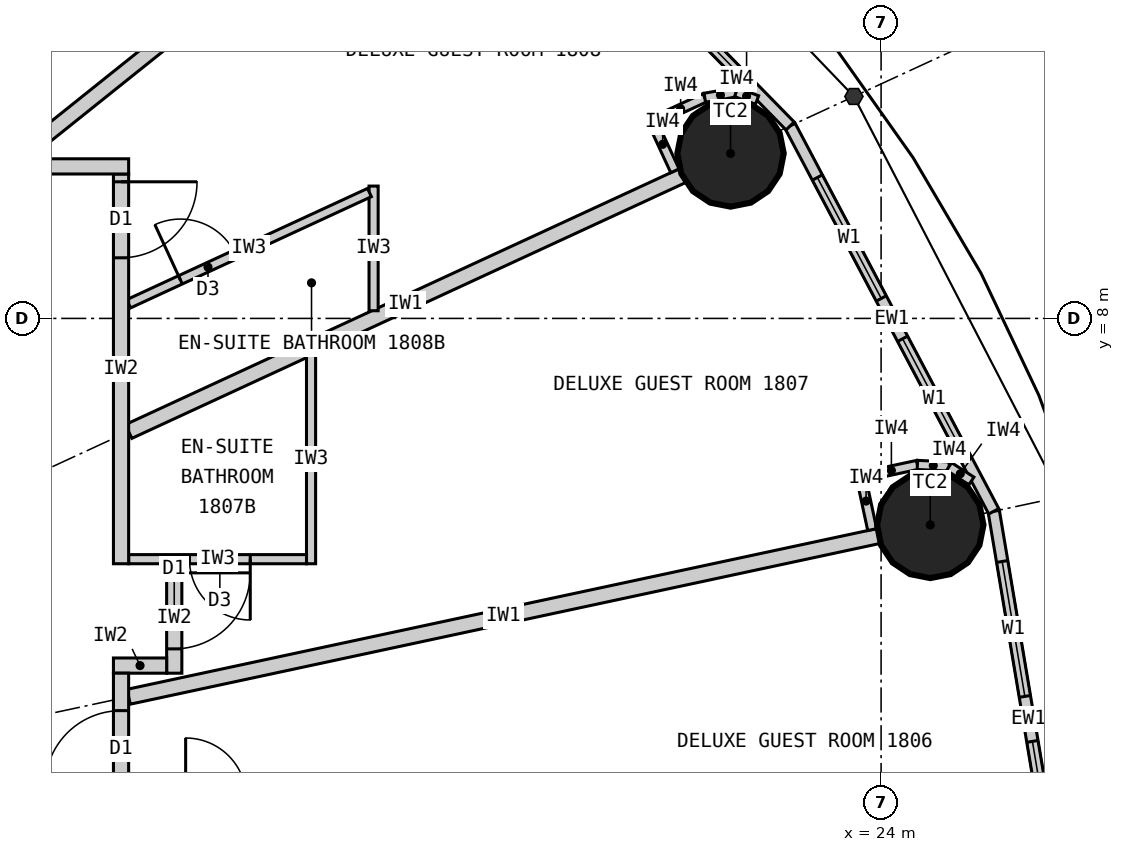
"""IFC4 building model, lengths in metres.
Left out: names, types, materials, properties, quantities, classifications, styles, units other than length and angle.
Written with IfcOpenShell. Run it as: python <this file> out.ifc"""

import sys

from ifc_helpers import new_model, si_unit, direction, frame, frame_2d, origin, origin_2d, place, context, subcontext, project, spatial, rectangle, circle, extrude, element, fill, save


model = new_model("IFC4")
c1 = context("Model", 3, precision=1e-05, world=origin(), true_north=direction((0.0, 1.0)))
c2 = subcontext(c1, "Body", "Model", "MODEL_VIEW")
j1 = project(units=[si_unit("LENGTHUNIT", "METRE"), si_unit("PLANEANGLEUNIT", "RADIAN")], contexts=[c1])
p1 = place(None, origin())
s1 = spatial("IfcSite", under=j1, at=p1, CompositionType="ELEMENT")
p2 = place(p1, origin())
s2 = spatial("IfcBuilding", under=s1, at=p2, CompositionType="ELEMENT")
p3 = place(p2, frame((0.0, 0.0, 73.8)))
s3 = spatial("IfcBuildingStorey", under=s2, at=p3, CompositionType="ELEMENT", Elevation=73.8)
for number, where, z_axis, x_axis in (
    (1, (24.647, 5.283, 0.0), (0.0, 0.0, 1.0), (1.0, 0.0, 0.0)),
    (2, (22.019, 10.17, 0.0), (0.0, 0.0, 1.0), (1.0, 0.0, 0.0)),
):
    element("IfcColumn", number, at=place(p3, frame(where, z_axis=z_axis, x_axis=x_axis)), inside=s3, PredefinedType="COLUMN", context=c2, shape_type="SweptSolid", body=[
        extrude(circle(Radius=0.7, at=origin_2d()), origin(), (0.0, 0.0, 1.0), 3.3),
    ])
p4 = place(p3, frame((26.4, 0.0, 0.0), z_axis=(0.0, 0.0, 1.0), x_axis=(-0.165642551694, 0.986185857264, 0.0)))
e3 = element("IfcWall", 3, at=p4, inside=s3, PredefinedType="ELEMENTEDWALL", context=c2, shape_type="SweptSolid", body=[
    extrude(rectangle(XDim=5.539, YDim=0.15, at=frame_2d((2.77, 0.0))), origin(), (0.0, 0.0, 1.0), 3.12),
])
p5 = place(p4, frame((0.669, 0.0, 0.9)))
e4 = element("IfcOpeningElement", 4, at=p5, cuts=e3, PredefinedType="OPENING", context=c2, shape_type="SweptSolid", body=[
    extrude(rectangle(XDim=1.8, YDim=1.9, at=frame_2d((0.9, 0.95))), frame((0.0, 0.085, 0.0), z_axis=(0.0, -1.0, 0.0), x_axis=(1.0, 0.0, 0.0)), (0.0, 0.0, 1.0), 0.17),
])
p6 = place(p4, frame((3.07, 0.0, 0.9)))
e5 = element("IfcOpeningElement", 5, at=p6, cuts=e3, PredefinedType="OPENING", context=c2, shape_type="SweptSolid", body=[
    extrude(rectangle(XDim=1.8, YDim=1.9, at=frame_2d((0.9, 0.95))), frame((0.0, 0.085, 0.0), z_axis=(0.0, -1.0, 0.0), x_axis=(1.0, 0.0, 0.0)), (0.0, 0.0, 1.0), 0.17),
])
p7 = place(p3, frame((25.482, 5.462, 0.0), z_axis=(0.0, 0.0, 1.0), x_axis=(-0.467296867008, 0.884100468321, 0.0)))
e6 = element("IfcWall", 6, at=p7, inside=s3, PredefinedType="ELEMENTEDWALL", context=c2, shape_type="SweptSolid", body=[
    extrude(rectangle(XDim=5.734, YDim=0.15, at=frame_2d((2.867, 0.0))), origin(), (0.0, 0.0, 1.0), 3.12),
])
p8 = place(p7, frame((0.767, 0.0, 0.9)))
e7 = element("IfcOpeningElement", 7, at=p8, cuts=e6, PredefinedType="OPENING", context=c2, shape_type="SweptSolid", body=[
    extrude(rectangle(XDim=1.8, YDim=1.9, at=frame_2d((0.9, 0.95))), frame((0.0, 0.085, 0.0), z_axis=(0.0, -1.0, 0.0), x_axis=(1.0, 0.0, 0.0)), (0.0, 0.0, 1.0), 0.17),
])
p9 = place(p7, frame((3.167, 0.0, 0.9)))
e8 = element("IfcOpeningElement", 8, at=p9, cuts=e6, PredefinedType="OPENING", context=c2, shape_type="SweptSolid", body=[
    extrude(rectangle(XDim=1.8, YDim=1.9, at=frame_2d((0.9, 0.95))), frame((0.0, 0.085, 0.0), z_axis=(0.0, -1.0, 0.0), x_axis=(1.0, 0.0, 0.0)), (0.0, 0.0, 1.0), 0.17),
])
p10 = place(p3, frame((22.803, 10.532, 0.0), z_axis=(0.0, 0.0, 1.0), x_axis=(-0.699602905915, 0.714531856557, 0.0)))
e9 = element("IfcWall", 9, at=p10, inside=s3, PredefinedType="ELEMENTEDWALL", context=c2, shape_type="SweptSolid", body=[
    extrude(rectangle(XDim=6.051, YDim=0.15, at=frame_2d((3.025, 0.0))), origin(), (0.0, 0.0, 1.0), 3.12),
])
p11 = place(p10, frame((0.926, 0.0, 0.9)))
e10 = element("IfcOpeningElement", 10, at=p11, cuts=e9, PredefinedType="OPENING", context=c2, shape_type="SweptSolid", body=[
    extrude(rectangle(XDim=1.8, YDim=1.9, at=frame_2d((0.9, 0.95))), frame((0.0, 0.085, 0.0), z_axis=(0.0, -1.0, 0.0), x_axis=(1.0, 0.0, 0.0)), (0.0, 0.0, 1.0), 0.17),
])
p12 = place(p10, frame((3.325, 0.0, 0.9)))
e11 = element("IfcOpeningElement", 11, at=p12, cuts=e9, PredefinedType="OPENING", context=c2, shape_type="SweptSolid", body=[
    extrude(rectangle(XDim=1.8, YDim=1.9, at=frame_2d((0.9, 0.95))), frame((0.0, 0.085, 0.0), z_axis=(0.0, -1.0, 0.0), x_axis=(1.0, 0.0, 0.0)), (0.0, 0.0, 1.0), 0.17),
])
p13 = place(p3, frame((14.1, 3.022, 0.0), z_axis=(0.0, 0.0, 1.0), x_axis=(0.977790014929, 0.209586943072, 0.0)))
e12 = element("IfcWall", 12, at=p13, inside=s3, PredefinedType="PARTITIONING", context=c2, shape_type="SweptSolid", body=[
    extrude(rectangle(XDim=10.087, YDim=0.2, at=frame_2d((5.043, 0.0))), origin(), (0.0, 0.0, 1.0), 2.32),
])
p14 = place(p3, frame((14.1, 6.512, 0.0), z_axis=(0.0, 0.0, 1.0), x_axis=(0.907832871056, 0.419332181247, 0.0)))
e13 = element("IfcWall", 13, at=p14, inside=s3, PredefinedType="PARTITIONING", context=c2, shape_type="SweptSolid", body=[
    extrude(rectangle(XDim=8.023, YDim=0.2, at=frame_2d((4.011, 0.0))), origin(), (0.0, 0.0, 1.0), 2.32),
])
p15 = place(p3, frame((12.625, 10.1, 0.0), z_axis=(0.0, 0.0, 1.0), x_axis=(0.780892451574, 0.624665493744, 0.0)))
e14 = element("IfcWall", 14, at=p15, inside=s3, PredefinedType="PARTITIONING", context=c2, shape_type="SweptSolid", body=[
    extrude(rectangle(XDim=6.045, YDim=0.2, at=frame_2d((3.022, 0.0))), origin(), (0.0, 0.0, 1.0), 2.32),
])
p16 = place(p3, frame((16.5, 7.521, 0.0), z_axis=(0.0, 0.0, 1.0), x_axis=(0.0, -1.0, 0.0)))
e15 = element("IfcWall", 15, at=p16, inside=s3, PredefinedType="PARTITIONING", context=c2, shape_type="SweptSolid", body=[
    extrude(rectangle(XDim=2.749, YDim=0.12, at=frame_2d((1.374, 0.0))), origin(), (0.0, 0.0, 1.0), 3.12),
])
p17 = place(p3, frame((14.1, 4.833, 0.0), z_axis=(0.0, 0.0, 1.0), x_axis=(1.0, 0.0, 0.0)))
e16 = element("IfcWall", 16, at=p17, inside=s3, PredefinedType="PARTITIONING", context=c2, shape_type="SweptSolid", body=[
    extrude(rectangle(XDim=2.34, YDim=0.12, at=frame_2d((1.17, 0.0))), origin(), (0.0, 0.0, 1.0), 3.12),
])
p18 = place(p17, frame((0.8, 0.0, 0.0)))
e17 = element("IfcOpeningElement", 17, at=p18, cuts=e16, PredefinedType="OPENING", context=c2, shape_type="SweptSolid", body=[
    extrude(rectangle(XDim=0.8, YDim=2.1, at=frame_2d((0.4, 1.05))), frame((0.0, 0.07, 0.0), z_axis=(0.0, -1.0, 0.0), x_axis=(1.0, 0.0, 0.0)), (0.0, 0.0, 1.0), 0.14),
])
p19 = place(p3, frame((17.323, 8.101, 0.0), z_axis=(0.0, 0.0, 1.0), x_axis=(0.0, 1.0, 0.0)))
e18 = element("IfcWall", 18, at=p19, inside=s3, PredefinedType="PARTITIONING", context=c2, shape_type="SweptSolid", body=[
    extrude(rectangle(XDim=1.64, YDim=0.12, at=frame_2d((0.82, 0.0))), origin(), (0.0, 0.0, 1.0), 3.12),
])
p20 = place(p3, frame((14.1, 8.193, 0.0), z_axis=(0.0, 0.0, 1.0), x_axis=(0.907836493557, 0.419324338628, 0.0)))
e19 = element("IfcWall", 19, at=p20, inside=s3, PredefinedType="PARTITIONING", context=c2, shape_type="SweptSolid", body=[
    extrude(rectangle(XDim=3.49, YDim=0.12, at=frame_2d((1.745, 0.0))), origin(), (0.0, 0.0, 1.0), 3.12),
])
p21 = place(p20, frame((0.75, 0.0, 0.0)))
e20 = element("IfcOpeningElement", 20, at=p21, cuts=e19, PredefinedType="OPENING", context=c2, shape_type="SweptSolid", body=[
    extrude(rectangle(XDim=0.8, YDim=2.1, at=frame_2d((0.4, 1.05))), frame((0.0, 0.07, 0.0), z_axis=(0.0, -1.0, 0.0), x_axis=(1.0, 0.0, 0.0)), (0.0, 0.0, 1.0), 0.14),
])
p22 = place(p3, frame((14.7, 3.333, 0.0), z_axis=(0.0, 0.0, 1.0), x_axis=(0.0, 1.0, 0.0)))
e21 = element("IfcWall", 21, at=p22, inside=s3, PredefinedType="PARTITIONING", context=c2, shape_type="SweptSolid", body=[
    extrude(rectangle(XDim=1.44, YDim=0.2, at=frame_2d((0.72, 0.0))), origin(), (0.0, 0.0, 1.0), 3.12),
])
p23 = place(p22, frame((0.32, 0.0, 0.0)))
e22 = element("IfcOpeningElement", 22, at=p23, cuts=e21, PredefinedType="OPENING", context=c2, shape_type="SweptSolid", body=[
    extrude(rectangle(XDim=1.0, YDim=2.2, at=frame_2d((0.5, 1.1))), frame((0.0, 0.11, 0.0), z_axis=(0.0, -1.0, 0.0), x_axis=(1.0, 0.0, 0.0)), (0.0, 0.0, 1.0), 0.22),
])
p24 = place(p3, frame((13.9, 3.433, 0.0), z_axis=(0.0, 0.0, 1.0), x_axis=(1.0, 0.0, 0.0)))
e23 = element("IfcWall", 23, at=p24, inside=s3, PredefinedType="PARTITIONING", context=c2, shape_type="SweptSolid", body=[
    extrude(rectangle(XDim=0.7, YDim=0.2, at=frame_2d((0.35, 0.0))), origin(), (0.0, 0.0, 1.0), 2.32),
])
p25 = place(p3, frame((14.0, -9.9, 0.0), z_axis=(0.0, 0.0, 1.0), x_axis=(0.0, 1.0, 0.0)))
e24 = element("IfcWall", 24, at=p25, inside=s3, PredefinedType="PARTITIONING", context=c2, shape_type="SweptSolid", body=[
    extrude(rectangle(XDim=13.232, YDim=0.2, at=frame_2d((6.616, 0.0))), origin(), (0.0, 0.0, 1.0), 3.12),
])
p26 = place(p25, frame((4.948, 0.0, 0.0)))
e25 = element("IfcOpeningElement", 25, at=p26, cuts=e24, PredefinedType="OPENING", context=c2, shape_type="SweptSolid", body=[
    extrude(rectangle(XDim=1.0, YDim=2.2, at=frame_2d((0.5, 1.1))), frame((0.0, 0.11, 0.0), z_axis=(0.0, -1.0, 0.0), x_axis=(1.0, 0.0, 0.0)), (0.0, 0.0, 1.0), 0.22),
])
p27 = place(p25, frame((8.718, 0.0, 0.0)))
e26 = element("IfcOpeningElement", 26, at=p27, cuts=e24, PredefinedType="OPENING", context=c2, shape_type="SweptSolid", body=[
    extrude(rectangle(XDim=1.0, YDim=2.2, at=frame_2d((0.5, 1.1))), frame((0.0, 0.11, 0.0), z_axis=(0.0, -1.0, 0.0), x_axis=(1.0, 0.0, 0.0)), (0.0, 0.0, 1.0), 0.22),
])
p28 = place(p25, frame((11.74, 0.0, 0.0)))
e27 = element("IfcOpeningElement", 27, at=p28, cuts=e24, PredefinedType="OPENING", context=c2, shape_type="SweptSolid", body=[
    extrude(rectangle(XDim=1.0, YDim=2.2, at=frame_2d((0.5, 1.1))), frame((0.0, 0.11, 0.0), z_axis=(0.0, -1.0, 0.0), x_axis=(1.0, 0.0, 0.0)), (0.0, 0.0, 1.0), 0.22),
])
p29 = place(p3, frame((14.0, 4.772, 0.0), z_axis=(0.0, 0.0, 1.0), x_axis=(0.0, 1.0, 0.0)))
e28 = element("IfcWall", 28, at=p29, inside=s3, PredefinedType="PARTITIONING", context=c2, shape_type="SweptSolid", body=[
    extrude(rectangle(XDim=5.127, YDim=0.2, at=frame_2d((2.564, 0.0))), origin(), (0.0, 0.0, 1.0), 3.12),
])
p30 = place(p29, frame((4.025, 0.0, 0.0)))
e29 = element("IfcOpeningElement", 29, at=p30, cuts=e28, PredefinedType="OPENING", context=c2, shape_type="SweptSolid", body=[
    extrude(rectangle(XDim=1.0, YDim=2.2, at=frame_2d((0.5, 1.1))), frame((0.0, 0.11, 0.0), z_axis=(0.0, -1.0, 0.0), x_axis=(1.0, 0.0, 0.0)), (0.0, 0.0, 1.0), 0.22),
])
p31 = place(p3, frame((10.885, 10.0, 0.0), z_axis=(0.0, 0.0, 1.0), x_axis=(1.0, 0.0, 0.0)))
e30 = element("IfcWall", 30, at=p31, inside=s3, PredefinedType="PARTITIONING", context=c2, shape_type="SweptSolid", body=[
    extrude(rectangle(XDim=3.215, YDim=0.2, at=frame_2d((1.607, 0.0))), origin(), (0.0, 0.0, 1.0), 3.12),
])
p32 = place(p3, frame((23.883, 5.222, 0.0), z_axis=(0.0, 0.0, 1.0), x_axis=(-0.209311842415, 0.977848941619, 0.0)))
e31 = element("IfcWall", 31, at=p32, inside=s3, PredefinedType="PARTITIONING", context=c2, shape_type="SweptSolid", body=[
    extrude(rectangle(XDim=0.768, YDim=0.12, at=frame_2d((0.384, 0.0))), origin(), (0.0, 0.0, 1.0), 3.12),
])
p33 = place(p3, frame((23.793, 5.926, 0.0), z_axis=(0.0, 0.0, 1.0), x_axis=(0.977792206673, 0.209576717621, 0.0)))
e32 = element("IfcWall", 32, at=p33, inside=s3, PredefinedType="PARTITIONING", context=c2, shape_type="SweptSolid", body=[
    extrude(rectangle(XDim=0.7, YDim=0.12, at=frame_2d((0.35, 0.0))), origin(), (0.0, 0.0, 1.0), 3.12),
])
p34 = place(p3, frame((24.478, 6.073, 0.0), z_axis=(0.0, 0.0, 1.0), x_axis=(0.998708262812, -0.05081147302, 0.0)))
e33 = element("IfcWall", 33, at=p34, inside=s3, PredefinedType="PARTITIONING", context=c2, shape_type="SweptSolid", body=[
    extrude(rectangle(XDim=0.418, YDim=0.12, at=frame_2d((0.209, 0.0))), origin(), (0.0, 0.0, 1.0), 3.12),
])
p35 = place(p3, frame((24.895, 6.052, 0.0), z_axis=(0.0, 0.0, 1.0), x_axis=(0.839495197275, -0.54336710772, 0.0)))
e34 = element("IfcWall", 34, at=p35, inside=s3, PredefinedType="PARTITIONING", context=c2, shape_type="SweptSolid", body=[
    extrude(rectangle(XDim=0.35, YDim=0.12, at=frame_2d((0.175, 0.0))), origin(), (0.0, 0.0, 1.0), 3.12),
])
p36 = place(p3, frame((21.287, 9.942, 0.0), z_axis=(0.0, 0.0, 1.0), x_axis=(-0.419259891039, 0.907866258744, 0.0)))
e35 = element("IfcWall", 35, at=p36, inside=s3, PredefinedType="PARTITIONING", context=c2, shape_type="SweptSolid", body=[
    extrude(rectangle(XDim=0.768, YDim=0.12, at=frame_2d((0.384, 0.0))), origin(), (0.0, 0.0, 1.0), 3.12),
])
p37 = place(p3, frame((21.045, 10.61, 0.0), z_axis=(0.0, 0.0, 1.0), x_axis=(0.907877701396, 0.419235112208, 0.0)))
e36 = element("IfcWall", 36, at=p37, inside=s3, PredefinedType="PARTITIONING", context=c2, shape_type="SweptSolid", body=[
    extrude(rectangle(XDim=0.7, YDim=0.12, at=frame_2d((0.35, 0.0))), origin(), (0.0, 0.0, 1.0), 3.12),
])
p38 = place(p3, frame((21.68, 10.903, 0.0), z_axis=(0.0, 0.0, 1.0), x_axis=(0.985446622073, 0.169985161247, 0.0)))
e37 = element("IfcWall", 37, at=p38, inside=s3, PredefinedType="PARTITIONING", context=c2, shape_type="SweptSolid", body=[
    extrude(rectangle(XDim=0.418, YDim=0.12, at=frame_2d((0.209, 0.0))), origin(), (0.0, 0.0, 1.0), 3.12),
])
p39 = place(p3, frame((22.092, 10.974, 0.0), z_axis=(0.0, 0.0, 1.0), x_axis=(0.938428160676, -0.345474437912, 0.0)))
e38 = element("IfcWall", 38, at=p39, inside=s3, PredefinedType="PARTITIONING", context=c2, shape_type="SweptSolid", body=[
    extrude(rectangle(XDim=0.294, YDim=0.12, at=frame_2d((0.147, 0.0))), origin(), (0.0, 0.0, 1.0), 3.12),
])
p40 = place(p5, origin())
e39 = element("IfcWindow", 39, at=p40, inside=s3, PartitioningType="SINGLE_PANEL", PredefinedType="WINDOW", context=c2, shape_type="SweptSolid", body=[
    extrude(rectangle(XDim=1.8, YDim=1.9, at=frame_2d((0.9, 0.95))), frame((0.0, 0.03, 0.0), z_axis=(0.0, -1.0, 0.0), x_axis=(1.0, 0.0, 0.0)), (0.0, 0.0, 1.0), 0.06),
])
fill(e4, e39)
p41 = place(p6, origin())
e40 = element("IfcWindow", 40, at=p41, inside=s3, PartitioningType="SINGLE_PANEL", PredefinedType="WINDOW", context=c2, shape_type="SweptSolid", body=[
    extrude(rectangle(XDim=1.8, YDim=1.9, at=frame_2d((0.9, 0.95))), frame((0.0, 0.03, 0.0), z_axis=(0.0, -1.0, 0.0), x_axis=(1.0, 0.0, 0.0)), (0.0, 0.0, 1.0), 0.06),
])
fill(e5, e40)
p42 = place(p8, origin())
e41 = element("IfcWindow", 41, at=p42, inside=s3, PartitioningType="SINGLE_PANEL", PredefinedType="WINDOW", context=c2, shape_type="SweptSolid", body=[
    extrude(rectangle(XDim=1.8, YDim=1.9, at=frame_2d((0.9, 0.95))), frame((0.0, 0.03, 0.0), z_axis=(0.0, -1.0, 0.0), x_axis=(1.0, 0.0, 0.0)), (0.0, 0.0, 1.0), 0.06),
])
fill(e7, e41)
p43 = place(p9, origin())
e42 = element("IfcWindow", 42, at=p43, inside=s3, PartitioningType="SINGLE_PANEL", PredefinedType="WINDOW", context=c2, shape_type="SweptSolid", body=[
    extrude(rectangle(XDim=1.8, YDim=1.9, at=frame_2d((0.9, 0.95))), frame((0.0, 0.03, 0.0), z_axis=(0.0, -1.0, 0.0), x_axis=(1.0, 0.0, 0.0)), (0.0, 0.0, 1.0), 0.06),
])
fill(e8, e42)
p44 = place(p11, origin())
e43 = element("IfcWindow", 43, at=p44, inside=s3, PartitioningType="SINGLE_PANEL", PredefinedType="WINDOW", context=c2, shape_type="SweptSolid", body=[
    extrude(rectangle(XDim=1.8, YDim=1.9, at=frame_2d((0.9, 0.95))), frame((0.0, 0.03, 0.0), z_axis=(0.0, -1.0, 0.0), x_axis=(1.0, 0.0, 0.0)), (0.0, 0.0, 1.0), 0.06),
])
fill(e10, e43)
p45 = place(p28, origin())
e44 = element("IfcDoor", 44, at=p45, inside=s3, OperationType="SINGLE_SWING_LEFT", PredefinedType="DOOR", context=c2, shape_type="SweptSolid", body=[
    extrude(rectangle(XDim=1.0, YDim=2.2, at=frame_2d((0.5, 1.1))), frame((0.0, 0.025, 0.0), z_axis=(0.0, -1.0, 0.0), x_axis=(1.0, 0.0, 0.0)), (0.0, 0.0, 1.0), 0.05),
])
fill(e27, e44)
p46 = place(p18, origin())
e45 = element("IfcDoor", 45, at=p46, inside=s3, OperationType="SINGLE_SWING_RIGHT", PredefinedType="DOOR", context=c2, shape_type="SweptSolid", body=[
    extrude(rectangle(XDim=0.8, YDim=2.1, at=frame_2d((0.4, 1.05))), frame((0.0, 0.025, 0.0), z_axis=(0.0, -1.0, 0.0), x_axis=(1.0, 0.0, 0.0)), (0.0, 0.0, 1.0), 0.05),
])
fill(e17, e45)
p47 = place(p23, origin())
e46 = element("IfcDoor", 46, at=p47, inside=s3, OperationType="SINGLE_SWING_RIGHT", PredefinedType="DOOR", context=c2, shape_type="SweptSolid", body=[
    extrude(rectangle(XDim=1.0, YDim=2.2, at=frame_2d((0.5, 1.1))), frame((0.0, 0.025, 0.0), z_axis=(0.0, -1.0, 0.0), x_axis=(1.0, 0.0, 0.0)), (0.0, 0.0, 1.0), 0.05),
])
fill(e22, e46)
p48 = place(p21, origin())
e47 = element("IfcDoor", 47, at=p48, inside=s3, OperationType="SINGLE_SWING_LEFT", PredefinedType="DOOR", context=c2, shape_type="SweptSolid", body=[
    extrude(rectangle(XDim=0.8, YDim=2.1, at=frame_2d((0.4, 1.05))), frame((0.0, 0.025, 0.0), z_axis=(0.0, -1.0, 0.0), x_axis=(1.0, 0.0, 0.0)), (0.0, 0.0, 1.0), 0.05),
])
fill(e20, e47)
p49 = place(p30, origin())
e48 = element("IfcDoor", 48, at=p49, inside=s3, OperationType="SINGLE_SWING_RIGHT", PredefinedType="DOOR", context=c2, shape_type="SweptSolid", body=[
    extrude(rectangle(XDim=1.0, YDim=2.2, at=frame_2d((0.5, 1.1))), frame((0.0, 0.025, 0.0), z_axis=(0.0, -1.0, 0.0), x_axis=(1.0, 0.0, 0.0)), (0.0, 0.0, 1.0), 0.05),
])
fill(e29, e48)
save(model, sys.argv[1])
